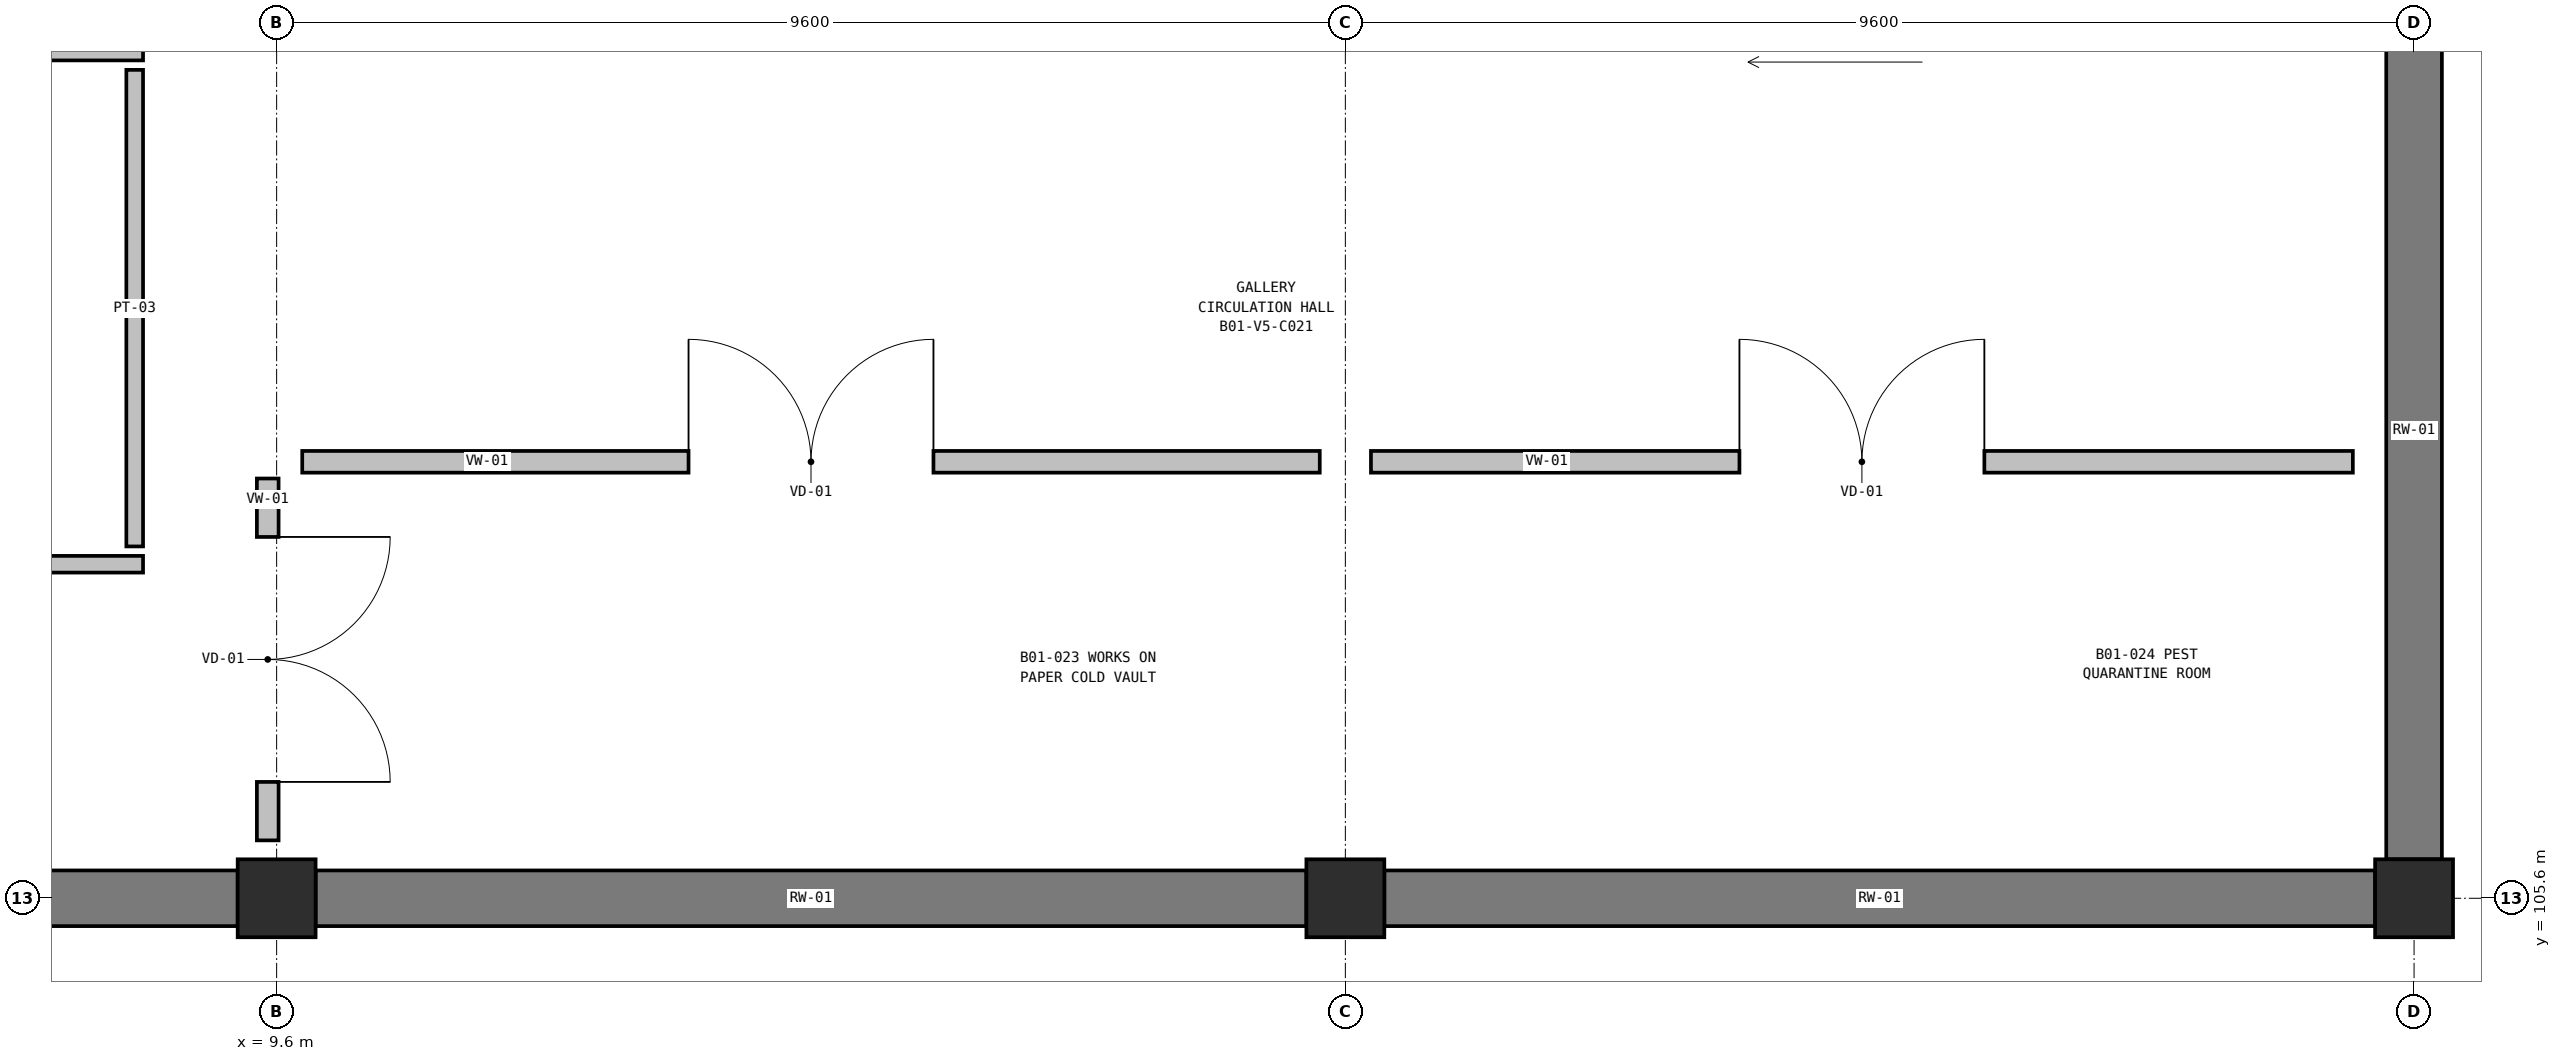
"""IFC4 building model, lengths in metres.
Left out: names, types, materials, properties, quantities, classifications, styles, units other than length and angle.
Written with IfcOpenShell. Run it as: python <this file> out.ifc"""

import sys

from ifc_helpers import new_model, si_unit, direction, frame, frame_2d, origin, origin_2d, place, context, subcontext, project, spatial, rectangle, extrude, element, fill, save


model = new_model("IFC4")
c1 = context("Model", 3, precision=1e-05, world=origin(), true_north=direction((0.0, 1.0)))
c2 = subcontext(c1, "Body", "Model", "MODEL_VIEW")
j1 = project(units=[si_unit("LENGTHUNIT", "METRE"), si_unit("PLANEANGLEUNIT", "RADIAN")], contexts=[c1])
p1 = place(None, origin())
s1 = spatial("IfcSite", under=j1, at=p1, CompositionType="ELEMENT")
p2 = place(p1, origin())
s2 = spatial("IfcBuilding", under=s1, at=p2, CompositionType="ELEMENT")
p3 = place(p2, frame((0.0, 0.0, -5.4)))
s3 = spatial("IfcBuildingStorey", under=s2, at=p3, CompositionType="ELEMENT", Elevation=-5.4)
for number, where, z_axis, x_axis in (
    (1, (9.6, 105.6, 0.0), (0.0, 0.0, 1.0), (1.0, 0.0, 0.0)),
    (2, (19.2, 105.6, 0.0), (0.0, 0.0, 1.0), (1.0, 0.0, 0.0)),
    (3, (28.8, 105.6, 0.0), (0.0, 0.0, 1.0), (1.0, 0.0, 0.0)),
):
    element("IfcColumn", number, at=place(p3, frame(where, z_axis=z_axis, x_axis=x_axis)), inside=s3, PredefinedType="COLUMN", context=c2, shape_type="SweptSolid", body=[
        extrude(rectangle(XDim=0.7, YDim=0.7, at=origin_2d()), origin(), (0.0, 0.0, 1.0), 5.4),
    ])
p4 = place(p3, frame((28.8, 113.65, 0.0), z_axis=(0.0, 0.0, 1.0), x_axis=(0.0, -1.0, 0.0)))
e4 = element("IfcWall", 4, at=p4, inside=s3, PredefinedType="USERDEFINED", context=c2, shape_type="SweptSolid", body=[
    extrude(rectangle(XDim=7.7, YDim=0.5, at=frame_2d((3.85, 0.0))), origin(), (0.0, 0.0, 1.0), 5.06),
])
p5 = place(p3, frame((28.45, 105.6, 0.0), z_axis=(0.0, 0.0, 1.0), x_axis=(-1.0, 0.0, 0.0)))
e5 = element("IfcWall", 5, at=p5, inside=s3, PredefinedType="USERDEFINED", context=c2, shape_type="SweptSolid", body=[
    extrude(rectangle(XDim=8.9, YDim=0.5, at=frame_2d((4.45, 0.0))), origin(), (0.0, 0.0, 1.0), 5.06),
])
p6 = place(p3, frame((18.85, 105.6, 0.0), z_axis=(0.0, 0.0, 1.0), x_axis=(-1.0, 0.0, 0.0)))
e6 = element("IfcWall", 6, at=p6, inside=s3, PredefinedType="USERDEFINED", context=c2, shape_type="SweptSolid", body=[
    extrude(rectangle(XDim=8.9, YDim=0.5, at=frame_2d((4.45, 0.0))), origin(), (0.0, 0.0, 1.0), 5.06),
])
p7 = place(p3, frame((9.25, 105.6, 0.0), z_axis=(0.0, 0.0, 1.0), x_axis=(-1.0, 0.0, 0.0)))
e7 = element("IfcWall", 7, at=p7, inside=s3, PredefinedType="USERDEFINED", context=c2, shape_type="SweptSolid", body=[
    extrude(rectangle(XDim=8.9, YDim=0.5, at=frame_2d((4.45, 0.0))), origin(), (0.0, 0.0, 1.0), 5.06),
])
p8 = place(p3, frame((1.2, 113.2, 0.0), z_axis=(0.0, 0.0, 1.0), x_axis=(1.0, 0.0, 0.0)))
e8 = element("IfcWall", 8, at=p8, inside=s3, PredefinedType="PARTITIONING", context=c2, shape_type="SweptSolid", body=[
    extrude(rectangle(XDim=7.2, YDim=0.15, at=frame_2d((3.6, 0.0))), origin(), (0.0, 0.0, 1.0), 5.06),
])
p9 = place(p8, frame((1.35, 0.0, 0.0)))
e9 = element("IfcOpeningElement", 9, at=p9, cuts=e8, PredefinedType="OPENING", context=c2, shape_type="SweptSolid", body=[
    extrude(rectangle(XDim=0.9, YDim=2.1, at=frame_2d((0.45, 1.05))), frame((0.0, 0.085, 0.0), z_axis=(0.0, -1.0, 0.0), x_axis=(1.0, 0.0, 0.0)), (0.0, 0.0, 1.0), 0.17),
])
p10 = place(p8, frame((4.925, 0.0, 0.0)))
e10 = element("IfcOpeningElement", 10, at=p10, cuts=e8, PredefinedType="OPENING", context=c2, shape_type="SweptSolid", body=[
    extrude(rectangle(XDim=0.95, YDim=2.15, at=frame_2d((0.475, 1.075))), frame((0.0, 0.085, 0.0), z_axis=(0.0, -1.0, 0.0), x_axis=(1.0, 0.0, 0.0)), (0.0, 0.0, 1.0), 0.17),
])
p11 = place(p3, frame((1.2, 108.6, 0.0), z_axis=(0.0, 0.0, 1.0), x_axis=(1.0, 0.0, 0.0)))
e11 = element("IfcWall", 11, at=p11, inside=s3, PredefinedType="PARTITIONING", context=c2, shape_type="SweptSolid", body=[
    extrude(rectangle(XDim=7.2, YDim=0.15, at=frame_2d((3.6, 0.0))), origin(), (0.0, 0.0, 1.0), 5.06),
])
p12 = place(p3, frame((8.325, 108.76, 0.0), z_axis=(0.0, 0.0, 1.0), x_axis=(0.0, 1.0, 0.0)))
e12 = element("IfcWall", 12, at=p12, inside=s3, PredefinedType="PARTITIONING", context=c2, shape_type="SweptSolid", body=[
    extrude(rectangle(XDim=4.28, YDim=0.15, at=frame_2d((2.14, 0.0))), origin(), (0.0, 0.0, 1.0), 4.435),
])
p13 = place(p3, frame((9.52, 109.37, 0.0), z_axis=(0.0, 0.0, 1.0), x_axis=(0.0, -1.0, 0.0)))
e13 = element("IfcWall", 13, at=p13, inside=s3, PredefinedType="PARTITIONING", context=c2, shape_type="SweptSolid", body=[
    extrude(rectangle(XDim=3.25, YDim=0.195, at=frame_2d((1.625, 0.0))), origin(), (0.0, 0.0, 1.0), 4.335),
])
p14 = place(p13, frame((0.525, 0.0, 0.0)))
e14 = element("IfcOpeningElement", 14, at=p14, cuts=e13, PredefinedType="OPENING", context=c2, shape_type="SweptSolid", body=[
    extrude(rectangle(XDim=2.2, YDim=2.6, at=frame_2d((1.1, 1.3))), frame((0.0, 0.107, 0.0), z_axis=(0.0, -1.0, 0.0), x_axis=(1.0, 0.0, 0.0)), (0.0, 0.0, 1.0), 0.215),
])
p15 = place(p3, frame((9.83, 109.52, 0.0), z_axis=(0.0, 0.0, 1.0), x_axis=(1.0, 0.0, 0.0)))
e15 = element("IfcWall", 15, at=p15, inside=s3, PredefinedType="PARTITIONING", context=c2, shape_type="SweptSolid", body=[
    extrude(rectangle(XDim=9.14, YDim=0.195, at=frame_2d((4.57, 0.0))), origin(), (0.0, 0.0, 1.0), 4.335),
])
p16 = place(p15, frame((3.47, 0.0, 0.0)))
e16 = element("IfcOpeningElement", 16, at=p16, cuts=e15, PredefinedType="OPENING", context=c2, shape_type="SweptSolid", body=[
    extrude(rectangle(XDim=2.2, YDim=2.6, at=frame_2d((1.1, 1.3))), frame((0.0, 0.107, 0.0), z_axis=(0.0, -1.0, 0.0), x_axis=(1.0, 0.0, 0.0)), (0.0, 0.0, 1.0), 0.215),
])
p17 = place(p3, frame((19.43, 109.52, 0.0), z_axis=(0.0, 0.0, 1.0), x_axis=(1.0, 0.0, 0.0)))
e17 = element("IfcWall", 17, at=p17, inside=s3, PredefinedType="PARTITIONING", context=c2, shape_type="SweptSolid", body=[
    extrude(rectangle(XDim=8.82, YDim=0.195, at=frame_2d((4.41, 0.0))), origin(), (0.0, 0.0, 1.0), 5.06),
])
p18 = place(p17, frame((3.31, 0.0, 0.0)))
e18 = element("IfcOpeningElement", 18, at=p18, cuts=e17, PredefinedType="OPENING", context=c2, shape_type="SweptSolid", body=[
    extrude(rectangle(XDim=2.2, YDim=2.6, at=frame_2d((1.1, 1.3))), frame((0.0, 0.107, 0.0), z_axis=(0.0, -1.0, 0.0), x_axis=(1.0, 0.0, 0.0)), (0.0, 0.0, 1.0), 0.215),
])
p19 = place(p14, origin())
e19 = element("IfcDoor", 19, at=p19, inside=s3, OperationType="DOUBLE_DOOR_SINGLE_SWING", PredefinedType="DOOR", context=c2, shape_type="SweptSolid", body=[
    extrude(rectangle(XDim=2.2, YDim=2.6, at=frame_2d((1.1, 1.3))), frame((0.0, 0.025, 0.0), z_axis=(0.0, -1.0, 0.0), x_axis=(1.0, 0.0, 0.0)), (0.0, 0.0, 1.0), 0.05),
])
fill(e14, e19)
p20 = place(p16, origin())
e20 = element("IfcDoor", 20, at=p20, inside=s3, OperationType="DOUBLE_DOOR_SINGLE_SWING", PredefinedType="DOOR", context=c2, shape_type="SweptSolid", body=[
    extrude(rectangle(XDim=2.2, YDim=2.6, at=frame_2d((1.1, 1.3))), frame((0.0, 0.025, 0.0), z_axis=(0.0, -1.0, 0.0), x_axis=(1.0, 0.0, 0.0)), (0.0, 0.0, 1.0), 0.05),
])
fill(e16, e20)
p21 = place(p18, origin())
e21 = element("IfcDoor", 21, at=p21, inside=s3, OperationType="DOUBLE_DOOR_SINGLE_SWING", PredefinedType="DOOR", context=c2, shape_type="SweptSolid", body=[
    extrude(rectangle(XDim=2.2, YDim=2.6, at=frame_2d((1.1, 1.3))), frame((0.0, 0.025, 0.0), z_axis=(0.0, -1.0, 0.0), x_axis=(1.0, 0.0, 0.0)), (0.0, 0.0, 1.0), 0.05),
])
fill(e18, e21)
save(model, sys.argv[1])
